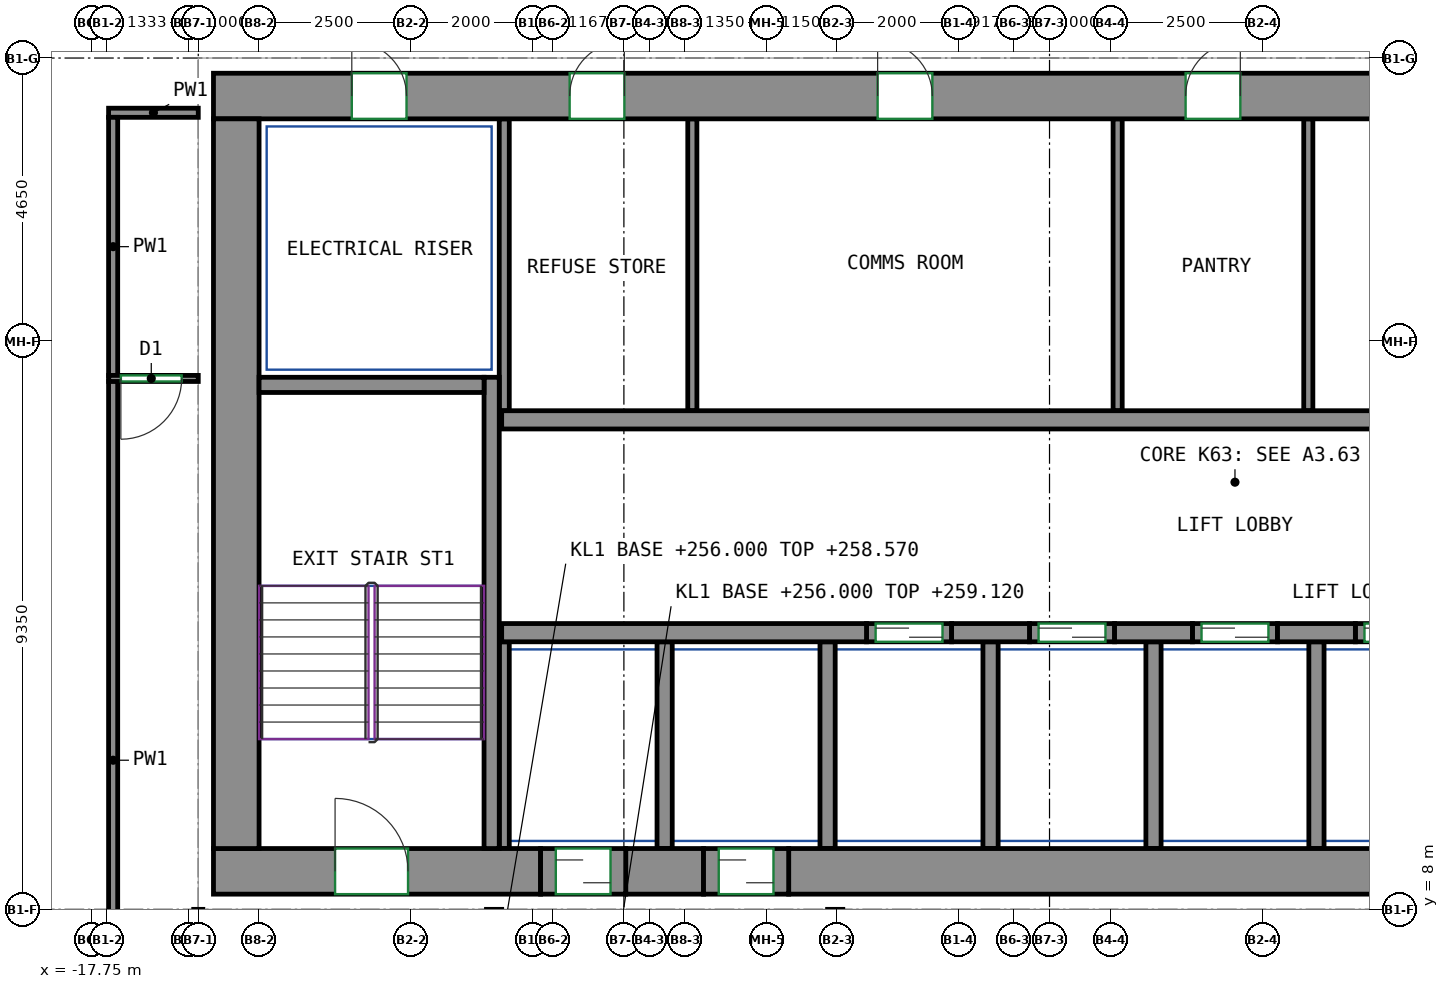
"""IFC4 building model, lengths in metres.
Left out: names, types, materials, properties, quantities, classifications, styles, units other than length and angle.
Written with IfcOpenShell. Run it as: python <this file> out.ifc"""

import sys

from ifc_helpers import new_model, si_unit, direction, frame, frame_2d, origin, place, context, subcontext, project, spatial, rectangle, extrude, source, transform, mapped, element, fill, save


model = new_model("IFC4")
c1 = context("Model", 3, precision=1e-05, world=origin(), true_north=direction((0.0, 1.0)))
c2 = subcontext(c1, "Body", "Model", "MODEL_VIEW")
j1 = project(units=[si_unit("LENGTHUNIT", "METRE"), si_unit("PLANEANGLEUNIT", "RADIAN")], contexts=[c1])
p1 = place(None, origin())
s1 = spatial("IfcSite", under=j1, at=p1, CompositionType="ELEMENT")
p2 = place(p1, origin())
s2 = spatial("IfcBuilding", under=s1, at=p2, CompositionType="ELEMENT")
p3 = place(p2, frame((0.0, 0.0, 256.0)))
s3 = spatial("IfcBuildingStorey", under=s2, at=p3, CompositionType="ELEMENT", Elevation=256.0)
m1 = source(origin(), c2, "Body", "SweptSolid", [
    extrude(rectangle(XDim=5.38, YDim=0.75, at=frame_2d((2.69, 0.0))), origin(), (0.0, 0.0, 1.0), 3.12),
])
p4 = place(p3, frame((-15.75, 8.625, 0.0), z_axis=(0.0, 0.0, 1.0), x_axis=(1.0, 0.0, 0.0)))
e1 = element("IfcWall", 1, at=p4, inside=s3, PredefinedType="SHEAR", context=c2, shape_type="MappedRepresentation", body=[
    mapped(m1, transform((0.0, 0.0, 0.0))),
])
p5 = place(p4, frame((2.0, 0.0, 0.0)))
e2 = element("IfcOpeningElement", 2, at=p5, cuts=e1, PredefinedType="OPENING", context=c2, shape_type="SweptSolid", body=[
    extrude(rectangle(XDim=1.2, YDim=2.1, at=frame_2d((0.6, 1.05))), frame((0.0, 0.385, 0.0), z_axis=(0.0, -1.0, 0.0), x_axis=(1.0, 0.0, 0.0)), (0.0, 0.0, 1.0), 0.77),
])
m2 = source(origin(), c2, "Body", "SweptSolid", [
    extrude(rectangle(XDim=1.28, YDim=0.75, at=frame_2d((0.64, 0.0))), origin(), (0.0, 0.0, 1.0), 3.12),
])
p6 = place(p3, frame((-8.97, 8.625, 0.0), z_axis=(0.0, 0.0, 1.0), x_axis=(1.0, 0.0, 0.0)))
e3 = element("IfcWall", 3, at=p6, inside=s3, PredefinedType="SHEAR", context=c2, shape_type="MappedRepresentation", body=[
    mapped(m2, transform((0.0, 0.0, 0.0))),
])
m3 = source(origin(), c2, "Body", "SweptSolid", [
    extrude(rectangle(XDim=14.18, YDim=0.75, at=frame_2d((7.09, 0.0))), origin(), (0.0, 0.0, 1.0), 3.12),
])
p7 = place(p3, frame((-6.29, 8.625, 0.0), z_axis=(0.0, 0.0, 1.0), x_axis=(1.0, 0.0, 0.0)))
e4 = element("IfcWall", 4, at=p7, inside=s3, PredefinedType="SHEAR", context=c2, shape_type="MappedRepresentation", body=[
    mapped(m3, transform((0.0, 0.0, 0.0))),
])
m4 = source(origin(), c2, "Body", "SweptSolid", [
    extrude(rectangle(XDim=33.6, YDim=0.75, at=frame_2d((16.8, 0.0))), origin(), (0.0, 0.0, 1.0), 3.12),
])
p8 = place(p3, frame((-15.75, 21.375, 0.0), z_axis=(0.0, 0.0, 1.0), x_axis=(1.0, 0.0, 0.0)))
e5 = element("IfcWall", 5, at=p8, inside=s3, PredefinedType="SHEAR", context=c2, shape_type="MappedRepresentation", body=[
    mapped(m4, transform((0.0, 0.0, 0.0))),
])
p9 = place(p8, frame((5.858, 0.0, 0.0)))
e6 = element("IfcOpeningElement", 6, at=p9, cuts=e5, PredefinedType="OPENING", context=c2, shape_type="SweptSolid", body=[
    extrude(rectangle(XDim=0.9, YDim=2.1, at=frame_2d((0.45, 1.05))), frame((0.0, 0.385, 0.0), z_axis=(0.0, -1.0, 0.0), x_axis=(1.0, 0.0, 0.0)), (0.0, 0.0, 1.0), 0.77),
])
p10 = place(p8, frame((10.923, 0.0, 0.0)))
e7 = element("IfcOpeningElement", 7, at=p10, cuts=e5, PredefinedType="OPENING", context=c2, shape_type="SweptSolid", body=[
    extrude(rectangle(XDim=0.9, YDim=2.1, at=frame_2d((0.45, 1.05))), frame((0.0, 0.385, 0.0), z_axis=(0.0, -1.0, 0.0), x_axis=(1.0, 0.0, 0.0)), (0.0, 0.0, 1.0), 0.77),
])
p11 = place(p8, frame((15.988, 0.0, 0.0)))
e8 = element("IfcOpeningElement", 8, at=p11, cuts=e5, PredefinedType="OPENING", context=c2, shape_type="SweptSolid", body=[
    extrude(rectangle(XDim=0.9, YDim=2.1, at=frame_2d((0.45, 1.05))), frame((0.0, 0.385, 0.0), z_axis=(0.0, -1.0, 0.0), x_axis=(1.0, 0.0, 0.0)), (0.0, 0.0, 1.0), 0.77),
])
p12 = place(p8, frame((21.643, 0.0, 0.0)))
e9 = element("IfcOpeningElement", 9, at=p12, cuts=e5, PredefinedType="OPENING", context=c2, shape_type="SweptSolid", body=[
    extrude(rectangle(XDim=0.9, YDim=2.1, at=frame_2d((0.45, 1.05))), frame((0.0, 0.385, 0.0), z_axis=(0.0, -1.0, 0.0), x_axis=(1.0, 0.0, 0.0)), (0.0, 0.0, 1.0), 0.77),
])
p13 = place(p8, frame((27.07, 0.0, 0.0)))
e10 = element("IfcOpeningElement", 10, at=p13, cuts=e5, PredefinedType="OPENING", context=c2, shape_type="SweptSolid", body=[
    extrude(rectangle(XDim=0.9, YDim=2.1, at=frame_2d((0.45, 1.05))), frame((0.0, 0.385, 0.0), z_axis=(0.0, -1.0, 0.0), x_axis=(1.0, 0.0, 0.0)), (0.0, 0.0, 1.0), 0.77),
])
p14 = place(p8, frame((2.275, 0.0, 0.0)))
e11 = element("IfcOpeningElement", 11, at=p14, cuts=e5, PredefinedType="OPENING", context=c2, shape_type="SweptSolid", body=[
    extrude(rectangle(XDim=0.9, YDim=2.1, at=frame_2d((0.45, 1.05))), frame((0.0, 0.385, 0.0), z_axis=(0.0, -1.0, 0.0), x_axis=(1.0, 0.0, 0.0)), (0.0, 0.0, 1.0), 0.77),
])
p15 = place(p8, frame((30.425, 0.0, 0.0)))
e12 = element("IfcOpeningElement", 12, at=p15, cuts=e5, PredefinedType="OPENING", context=c2, shape_type="SweptSolid", body=[
    extrude(rectangle(XDim=0.9, YDim=2.1, at=frame_2d((0.45, 1.05))), frame((0.0, 0.385, 0.0), z_axis=(0.0, -1.0, 0.0), x_axis=(1.0, 0.0, 0.0)), (0.0, 0.0, 1.0), 0.77),
])
m5 = source(origin(), c2, "Body", "SweptSolid", [
    extrude(rectangle(XDim=12.0, YDim=0.75, at=frame_2d((6.0, 0.0))), origin(), (0.0, 0.0, 1.0), 3.12),
])
p16 = place(p3, frame((-15.375, 9.0, 0.0), z_axis=(0.0, 0.0, 1.0), x_axis=(0.0, 1.0, 0.0)))
e13 = element("IfcWall", 13, at=p16, inside=s3, PredefinedType="SHEAR", context=c2, shape_type="MappedRepresentation", body=[
    mapped(m5, transform((0.0, 0.0, 0.0))),
])
m6 = source(origin(), c2, "Body", "SweptSolid", [
    extrude(rectangle(XDim=7.75, YDim=0.25, at=frame_2d((3.875, 0.0))), origin(), (0.0, 0.0, 1.0), 3.12),
])
p17 = place(p3, frame((-11.175, 9.0, 0.0), z_axis=(0.0, 0.0, 1.0), x_axis=(0.0, 1.0, 0.0)))
e14 = element("IfcWall", 14, at=p17, inside=s3, PredefinedType="SHEAR", context=c2, shape_type="MappedRepresentation", body=[
    mapped(m6, transform((0.0, 0.0, 0.0))),
])
m7 = source(origin(), c2, "Body", "SweptSolid", [
    extrude(rectangle(XDim=3.7, YDim=0.25, at=frame_2d((1.85, 0.0))), origin(), (0.0, 0.0, 1.0), 3.12),
])
p18 = place(p3, frame((-15.0, 16.625, 0.0), z_axis=(0.0, 0.0, 1.0), x_axis=(1.0, 0.0, 0.0)))
e15 = element("IfcWall", 15, at=p18, inside=s3, PredefinedType="SHEAR", context=c2, shape_type="MappedRepresentation", body=[
    mapped(m7, transform((0.0, 0.0, 0.0))),
])
m8 = source(origin(), c2, "Body", "SweptSolid", [
    extrude(rectangle(XDim=6.0, YDim=0.3, at=frame_2d((3.0, 0.0))), origin(), (0.0, 0.0, 1.0), 3.12),
])
p19 = place(p3, frame((-11.01, 12.55, 0.0), z_axis=(0.0, 0.0, 1.0), x_axis=(1.0, 0.0, 0.0)))
e16 = element("IfcWall", 16, at=p19, inside=s3, PredefinedType="SHEAR", context=c2, shape_type="MappedRepresentation", body=[
    mapped(m8, transform((0.0, 0.0, 0.0))),
])
m9 = source(origin(), c2, "Body", "SweptSolid", [
    extrude(rectangle(XDim=1.28, YDim=0.3, at=frame_2d((0.64, 0.0))), origin(), (0.0, 0.0, 1.0), 3.12),
])
for number, where, z_axis, x_axis in (
    (17, (-3.61, 12.55, 0.0), (0.0, 0.0, 1.0), (1.0, 0.0, 0.0)),
    (18, (-0.93, 12.55, 0.0), (0.0, 0.0, 1.0), (1.0, 0.0, 0.0)),
    (19, (1.75, 12.55, 0.0), (0.0, 0.0, 1.0), (1.0, 0.0, 0.0)),
):
    element("IfcWall", number, at=place(p3, frame(where, z_axis=z_axis, x_axis=x_axis)), inside=s3, PredefinedType="SHEAR", context=c2, shape_type="MappedRepresentation", body=[
        mapped(m9, transform((0.0, 0.0, 0.0))),
    ])
m10 = source(origin(), c2, "Body", "SweptSolid", [
    extrude(rectangle(XDim=22.08, YDim=0.3, at=frame_2d((11.04, 0.0))), origin(), (0.0, 0.0, 1.0), 3.12),
])
p20 = place(p3, frame((-11.01, 16.05, 0.0), z_axis=(0.0, 0.0, 1.0), x_axis=(1.0, 0.0, 0.0)))
e20 = element("IfcWall", 20, at=p20, inside=s3, PredefinedType="SHEAR", context=c2, shape_type="MappedRepresentation", body=[
    mapped(m10, transform((0.0, 0.0, 0.0))),
])
m11 = source(origin(), c2, "Body", "SweptSolid", [
    extrude(rectangle(XDim=1.4, YDim=0.3, at=frame_2d((0.7, 0.0))), origin(), (0.0, 0.0, 1.0), 3.12),
])
p21 = place(p3, frame((-5.01, 12.55, 0.0), z_axis=(0.0, 0.0, 1.0), x_axis=(1.0, 0.0, 0.0)))
e21 = element("IfcWall", 21, at=p21, inside=s3, PredefinedType="PARTITIONING", context=c2, shape_type="MappedRepresentation", body=[
    mapped(m11, transform((0.0, 0.0, 0.0))),
])
p22 = place(p21, frame((0.15, 0.0, 0.0)))
e22 = element("IfcOpeningElement", 22, at=p22, cuts=e21, PredefinedType="OPENING", context=c2, shape_type="SweptSolid", body=[
    extrude(rectangle(XDim=1.1, YDim=2.1, at=frame_2d((0.55, 1.05))), frame((0.0, 0.16, 0.0), z_axis=(0.0, -1.0, 0.0), x_axis=(1.0, 0.0, 0.0)), (0.0, 0.0, 1.0), 0.32),
])
m12 = source(origin(), c2, "Body", "SweptSolid", [
    extrude(rectangle(XDim=1.4, YDim=0.3, at=frame_2d((0.7, 0.0))), origin(), (0.0, 0.0, 1.0), 3.12),
])
p23 = place(p3, frame((-2.33, 12.55, 0.0), z_axis=(0.0, 0.0, 1.0), x_axis=(1.0, 0.0, 0.0)))
e23 = element("IfcWall", 23, at=p23, inside=s3, PredefinedType="PARTITIONING", context=c2, shape_type="MappedRepresentation", body=[
    mapped(m12, transform((0.0, 0.0, 0.0))),
])
p24 = place(p23, frame((0.15, 0.0, 0.0)))
e24 = element("IfcOpeningElement", 24, at=p24, cuts=e23, PredefinedType="OPENING", context=c2, shape_type="SweptSolid", body=[
    extrude(rectangle(XDim=1.1, YDim=2.1, at=frame_2d((0.55, 1.05))), frame((0.0, 0.16, 0.0), z_axis=(0.0, -1.0, 0.0), x_axis=(1.0, 0.0, 0.0)), (0.0, 0.0, 1.0), 0.32),
])
p25 = place(p3, frame((0.35, 12.55, 0.0), z_axis=(0.0, 0.0, 1.0), x_axis=(1.0, 0.0, 0.0)))
e25 = element("IfcWall", 25, at=p25, inside=s3, PredefinedType="PARTITIONING", context=c2, shape_type="MappedRepresentation", body=[
    mapped(m11, transform((0.0, 0.0, 0.0))),
])
p26 = place(p25, frame((0.15, 0.0, 0.0)))
e26 = element("IfcOpeningElement", 26, at=p26, cuts=e25, PredefinedType="OPENING", context=c2, shape_type="SweptSolid", body=[
    extrude(rectangle(XDim=1.1, YDim=2.1, at=frame_2d((0.55, 1.05))), frame((0.0, 0.16, 0.0), z_axis=(0.0, -1.0, 0.0), x_axis=(1.0, 0.0, 0.0)), (0.0, 0.0, 1.0), 0.32),
])
p27 = place(p3, frame((3.03, 12.55, 0.0), z_axis=(0.0, 0.0, 1.0), x_axis=(1.0, 0.0, 0.0)))
e27 = element("IfcWall", 27, at=p27, inside=s3, PredefinedType="PARTITIONING", context=c2, shape_type="MappedRepresentation", body=[
    mapped(m11, transform((0.0, 0.0, 0.0))),
])
p28 = place(p27, frame((0.15, 0.0, 0.0)))
e28 = element("IfcOpeningElement", 28, at=p28, cuts=e27, PredefinedType="OPENING", context=c2, shape_type="SweptSolid", body=[
    extrude(rectangle(XDim=1.1, YDim=2.1, at=frame_2d((0.55, 1.05))), frame((0.0, 0.16, 0.0), z_axis=(0.0, -1.0, 0.0), x_axis=(1.0, 0.0, 0.0)), (0.0, 0.0, 1.0), 0.32),
])
m13 = source(origin(), c2, "Body", "SweptSolid", [
    extrude(rectangle(XDim=4.8, YDim=0.165, at=frame_2d((2.4, 0.0))), origin(), (0.0, 0.0, 1.0), 3.12),
])
p29 = place(p3, frame((-10.968, 16.2, 0.0), z_axis=(0.0, 0.0, 1.0), x_axis=(0.0, 1.0, 0.0)))
e29 = element("IfcWall", 29, at=p29, inside=s3, PredefinedType="PARTITIONING", context=c2, shape_type="MappedRepresentation", body=[
    mapped(m13, transform((0.0, 0.0, 0.0))),
])
m14 = source(origin(), c2, "Body", "SweptSolid", [
    extrude(rectangle(XDim=3.4, YDim=0.25, at=frame_2d((1.7, 0.0))), origin(), (0.0, 0.0, 1.0), 3.12),
])
for number, where, z_axis, x_axis in (
    (30, (2.39, 9.0, 0.0), (0.0, 0.0, 1.0), (0.0, 1.0, 0.0)),
    (31, (-0.29, 9.0, 0.0), (0.0, 0.0, 1.0), (0.0, 1.0, 0.0)),
):
    element("IfcWall", number, at=place(p3, frame(where, z_axis=z_axis, x_axis=x_axis)), inside=s3, PredefinedType="PARTITIONING", context=c2, shape_type="MappedRepresentation", body=[
        mapped(m14, transform((0.0, 0.0, 0.0))),
    ])
m15 = source(origin(), c2, "Body", "SweptSolid", [
    extrude(rectangle(XDim=3.4, YDim=0.165, at=frame_2d((1.7, 0.0))), origin(), (0.0, 0.0, 1.0), 3.12),
])
p30 = place(p3, frame((-10.968, 9.0, 0.0), z_axis=(0.0, 0.0, 1.0), x_axis=(0.0, 1.0, 0.0)))
e32 = element("IfcWall", 32, at=p30, inside=s3, PredefinedType="PARTITIONING", context=c2, shape_type="MappedRepresentation", body=[
    mapped(m15, transform((0.0, 0.0, 0.0))),
])
for number, where, z_axis, x_axis in (
    (33, (-2.97, 9.0, 0.0), (0.0, 0.0, 1.0), (0.0, 1.0, 0.0)),
    (34, (-5.65, 9.0, 0.0), (0.0, 0.0, 1.0), (0.0, 1.0, 0.0)),
    (35, (-8.33, 9.0, 0.0), (0.0, 0.0, 1.0), (0.0, 1.0, 0.0)),
):
    element("IfcWall", number, at=place(p3, frame(where, z_axis=z_axis, x_axis=x_axis)), inside=s3, PredefinedType="PARTITIONING", context=c2, shape_type="MappedRepresentation", body=[
        mapped(m14, transform((0.0, 0.0, 0.0))),
    ])
m16 = source(origin(), c2, "Body", "SweptSolid", [
    extrude(rectangle(XDim=4.8, YDim=0.15, at=frame_2d((2.4, 0.0))), origin(), (0.0, 0.0, 1.0), 3.12),
])
for number, where, z_axis, x_axis in (
    (36, (-7.875, 16.2, 0.0), (0.0, 0.0, 1.0), (0.0, 1.0, 0.0)),
    (37, (-0.88, 16.2, 0.0), (0.0, 0.0, 1.0), (0.0, 1.0, 0.0)),
    (38, (2.256, 16.2, 0.0), (0.0, 0.0, 1.0), (0.0, 1.0, 0.0)),
):
    element("IfcWall", number, at=place(p3, frame(where, z_axis=z_axis, x_axis=x_axis)), inside=s3, PredefinedType="PARTITIONING", context=c2, shape_type="MappedRepresentation", body=[
        mapped(m16, transform((0.0, 0.0, 0.0))),
    ])
m17 = source(origin(), c2, "Body", "SweptSolid", [
    extrude(rectangle(XDim=1.4, YDim=0.75, at=frame_2d((0.7, 0.0))), origin(), (0.0, 0.0, 1.0), 2.7),
])
p31 = place(p3, frame((-10.37, 8.625, 0.0), z_axis=(0.0, 0.0, 1.0), x_axis=(1.0, 0.0, 0.0)))
e39 = element("IfcWall", 39, at=p31, inside=s3, PredefinedType="PARTITIONING", context=c2, shape_type="MappedRepresentation", body=[
    mapped(m17, transform((0.0, 0.0, 0.0))),
])
p32 = place(p31, frame((0.25, 0.0, 0.0)))
e40 = element("IfcOpeningElement", 40, at=p32, cuts=e39, PredefinedType="OPENING", context=c2, shape_type="SweptSolid", body=[
    extrude(rectangle(XDim=0.9, YDim=2.1, at=frame_2d((0.45, 1.05))), frame((0.0, 0.385, 0.0), z_axis=(0.0, -1.0, 0.0), x_axis=(1.0, 0.0, 0.0)), (0.0, 0.0, 1.0), 0.77),
])
m18 = source(origin(), c2, "Body", "SweptSolid", [
    extrude(rectangle(XDim=1.4, YDim=0.75, at=frame_2d((0.7, 0.0))), origin(), (0.0, 0.0, 1.0), 2.7),
])
p33 = place(p3, frame((-7.69, 8.625, 0.0), z_axis=(0.0, 0.0, 1.0), x_axis=(1.0, 0.0, 0.0)))
e41 = element("IfcWall", 41, at=p33, inside=s3, PredefinedType="PARTITIONING", context=c2, shape_type="MappedRepresentation", body=[
    mapped(m18, transform((0.0, 0.0, 0.0))),
])
p34 = place(p33, frame((0.25, 0.0, 0.0)))
e42 = element("IfcOpeningElement", 42, at=p34, cuts=e41, PredefinedType="OPENING", context=c2, shape_type="SweptSolid", body=[
    extrude(rectangle(XDim=0.9, YDim=2.1, at=frame_2d((0.45, 1.05))), frame((0.0, 0.385, 0.0), z_axis=(0.0, -1.0, 0.0), x_axis=(1.0, 0.0, 0.0)), (0.0, 0.0, 1.0), 0.77),
])
p35 = place(p3, frame((-17.4, 4.214, 0.0), z_axis=(0.0, 0.0, 1.0), x_axis=(0.0, 1.0, 0.0)))
e43 = element("IfcWall", 43, at=p35, inside=s3, PredefinedType="PARTITIONING", context=c2, shape_type="SweptSolid", body=[
    extrude(rectangle(XDim=12.477, YDim=0.15, at=frame_2d((6.238, 0.0))), origin(), (0.0, 0.0, 1.0), 3.12),
])
p36 = place(p3, frame((-17.475, 21.1, 0.0), z_axis=(0.0, 0.0, 1.0), x_axis=(1.0, 0.0, 0.0)))
e44 = element("IfcWall", 44, at=p36, inside=s3, PredefinedType="PARTITIONING", context=c2, shape_type="SweptSolid", body=[
    extrude(rectangle(XDim=1.475, YDim=0.15, at=frame_2d((0.738, 0.0))), origin(), (0.0, 0.0, 1.0), 3.12),
])
p37 = place(p3, frame((-17.4, 16.771, 0.0), z_axis=(0.0, 0.0, 1.0), x_axis=(0.0, 1.0, 0.0)))
e45 = element("IfcWall", 45, at=p37, inside=s3, PredefinedType="PARTITIONING", context=c2, shape_type="SweptSolid", body=[
    extrude(rectangle(XDim=4.254, YDim=0.15, at=frame_2d((2.127, 0.0))), origin(), (0.0, 0.0, 1.0), 3.12),
])
p38 = place(p3, frame((-16.0, 16.731, 0.0), z_axis=(0.0, 0.0, 1.0), x_axis=(-1.0, 0.0, 0.0)))
e46 = element("IfcWall", 46, at=p38, inside=s3, PredefinedType="PARTITIONING", context=c2, shape_type="SweptSolid", body=[
    extrude(rectangle(XDim=1.473, YDim=0.1, at=frame_2d((0.736, 0.0))), origin(), (0.0, 0.0, 1.0), 3.12),
])
p39 = place(p38, frame((0.273, 0.0, 0.0)))
e47 = element("IfcOpeningElement", 47, at=p39, cuts=e46, PredefinedType="OPENING", context=c2, shape_type="SweptSolid", body=[
    extrude(rectangle(XDim=1.0, YDim=2.1, at=frame_2d((0.5, 1.05))), frame((0.0, 0.06, 0.0), z_axis=(0.0, -1.0, 0.0), x_axis=(1.0, 0.0, 0.0)), (0.0, 0.0, 1.0), 0.12),
])
p40 = place(p32, origin())
e48 = element("IfcDoor", 48, at=p40, inside=s3, OperationType="SLIDING_TO_LEFT", PredefinedType="DOOR", context=c2, shape_type="SweptSolid", body=[
    extrude(rectangle(XDim=0.9, YDim=2.1, at=frame_2d((0.45, 1.05))), frame((0.0, 0.28, 0.0), z_axis=(0.0, -1.0, 0.0), x_axis=(1.0, 0.0, 0.0)), (0.0, 0.0, 1.0), 0.05),
])
fill(e40, e48)
p41 = place(p34, origin())
e49 = element("IfcDoor", 49, at=p41, inside=s3, OperationType="SLIDING_TO_RIGHT", PredefinedType="DOOR", context=c2, shape_type="SweptSolid", body=[
    extrude(rectangle(XDim=0.9, YDim=2.1, at=frame_2d((0.45, 1.05))), frame((0.0, 0.28, 0.0), z_axis=(0.0, -1.0, 0.0), x_axis=(1.0, 0.0, 0.0)), (0.0, 0.0, 1.0), 0.05),
])
fill(e42, e49)
p42 = place(p22, origin())
e50 = element("IfcDoor", 50, at=p42, inside=s3, OperationType="DOUBLE_DOOR_SLIDING", PredefinedType="DOOR", context=c2, shape_type="SweptSolid", body=[
    extrude(rectangle(XDim=1.1, YDim=2.1, at=frame_2d((0.55, 1.05))), frame((0.0, 0.025, 0.0), z_axis=(0.0, -1.0, 0.0), x_axis=(1.0, 0.0, 0.0)), (0.0, 0.0, 1.0), 0.05),
])
fill(e22, e50)
p43 = place(p24, origin())
e51 = element("IfcDoor", 51, at=p43, inside=s3, OperationType="DOUBLE_DOOR_SLIDING", PredefinedType="DOOR", context=c2, shape_type="SweptSolid", body=[
    extrude(rectangle(XDim=1.1, YDim=2.1, at=frame_2d((0.55, 1.05))), frame((0.0, 0.025, 0.0), z_axis=(0.0, -1.0, 0.0), x_axis=(1.0, 0.0, 0.0)), (0.0, 0.0, 1.0), 0.05),
])
fill(e24, e51)
p44 = place(p26, origin())
e52 = element("IfcDoor", 52, at=p44, inside=s3, OperationType="DOUBLE_DOOR_SLIDING", PredefinedType="DOOR", context=c2, shape_type="SweptSolid", body=[
    extrude(rectangle(XDim=1.1, YDim=2.1, at=frame_2d((0.55, 1.05))), frame((0.0, 0.025, 0.0), z_axis=(0.0, -1.0, 0.0), x_axis=(1.0, 0.0, 0.0)), (0.0, 0.0, 1.0), 0.05),
])
fill(e26, e52)
p45 = place(p28, origin())
e53 = element("IfcDoor", 53, at=p45, inside=s3, OperationType="DOUBLE_DOOR_SLIDING", PredefinedType="DOOR", context=c2, shape_type="SweptSolid", body=[
    extrude(rectangle(XDim=1.1, YDim=2.1, at=frame_2d((0.55, 1.05))), frame((0.0, 0.025, 0.0), z_axis=(0.0, -1.0, 0.0), x_axis=(1.0, 0.0, 0.0)), (0.0, 0.0, 1.0), 0.05),
])
fill(e28, e53)
p46 = place(p9, origin())
e54 = element("IfcDoor", 54, at=p46, inside=s3, OperationType="SINGLE_SWING_RIGHT", PredefinedType="DOOR", context=c2, shape_type="SweptSolid", body=[
    extrude(rectangle(XDim=0.9, YDim=2.1, at=frame_2d((0.45, 1.05))), frame((0.0, -0.23, 0.0), z_axis=(0.0, -1.0, 0.0), x_axis=(1.0, 0.0, 0.0)), (0.0, 0.0, 1.0), 0.05),
])
fill(e6, e54)
p47 = place(p10, origin())
e55 = element("IfcDoor", 55, at=p47, inside=s3, OperationType="SINGLE_SWING_LEFT", PredefinedType="DOOR", context=c2, shape_type="SweptSolid", body=[
    extrude(rectangle(XDim=0.9, YDim=2.1, at=frame_2d((0.45, 1.05))), frame((0.0, -0.23, 0.0), z_axis=(0.0, -1.0, 0.0), x_axis=(1.0, 0.0, 0.0)), (0.0, 0.0, 1.0), 0.05),
])
fill(e7, e55)
p48 = place(p11, origin())
e56 = element("IfcDoor", 56, at=p48, inside=s3, OperationType="SINGLE_SWING_RIGHT", PredefinedType="DOOR", context=c2, shape_type="SweptSolid", body=[
    extrude(rectangle(XDim=0.9, YDim=2.1, at=frame_2d((0.45, 1.05))), frame((0.0, -0.23, 0.0), z_axis=(0.0, -1.0, 0.0), x_axis=(1.0, 0.0, 0.0)), (0.0, 0.0, 1.0), 0.05),
])
fill(e8, e56)
p49 = place(p14, origin())
e57 = element("IfcDoor", 57, at=p49, inside=s3, OperationType="SINGLE_SWING_LEFT", PredefinedType="DOOR", context=c2, shape_type="SweptSolid", body=[
    extrude(rectangle(XDim=0.9, YDim=2.1, at=frame_2d((0.45, 1.05))), frame((0.0, -0.23, 0.0), z_axis=(0.0, -1.0, 0.0), x_axis=(1.0, 0.0, 0.0)), (0.0, 0.0, 1.0), 0.05),
])
fill(e11, e57)
p50 = place(p5, origin())
e58 = element("IfcDoor", 58, at=p50, inside=s3, OperationType="DOUBLE_DOOR_SINGLE_SWING", PredefinedType="DOOR", context=c2, shape_type="SweptSolid", body=[
    extrude(rectangle(XDim=1.2, YDim=2.1, at=frame_2d((0.6, 1.05))), frame((0.0, 0.28, 0.0), z_axis=(0.0, -1.0, 0.0), x_axis=(1.0, 0.0, 0.0)), (0.0, 0.0, 1.0), 0.05),
])
fill(e2, e58)
p51 = place(p39, origin())
e59 = element("IfcDoor", 59, at=p51, inside=s3, OperationType="SINGLE_SWING_RIGHT", PredefinedType="DOOR", context=c2, shape_type="SweptSolid", body=[
    extrude(rectangle(XDim=1.0, YDim=2.1, at=frame_2d((0.5, 1.05))), frame((0.0, 0.025, 0.0), z_axis=(0.0, -1.0, 0.0), x_axis=(1.0, 0.0, 0.0)), (0.0, 0.0, 1.0), 0.05),
])
fill(e47, e59)
save(model, sys.argv[1])
